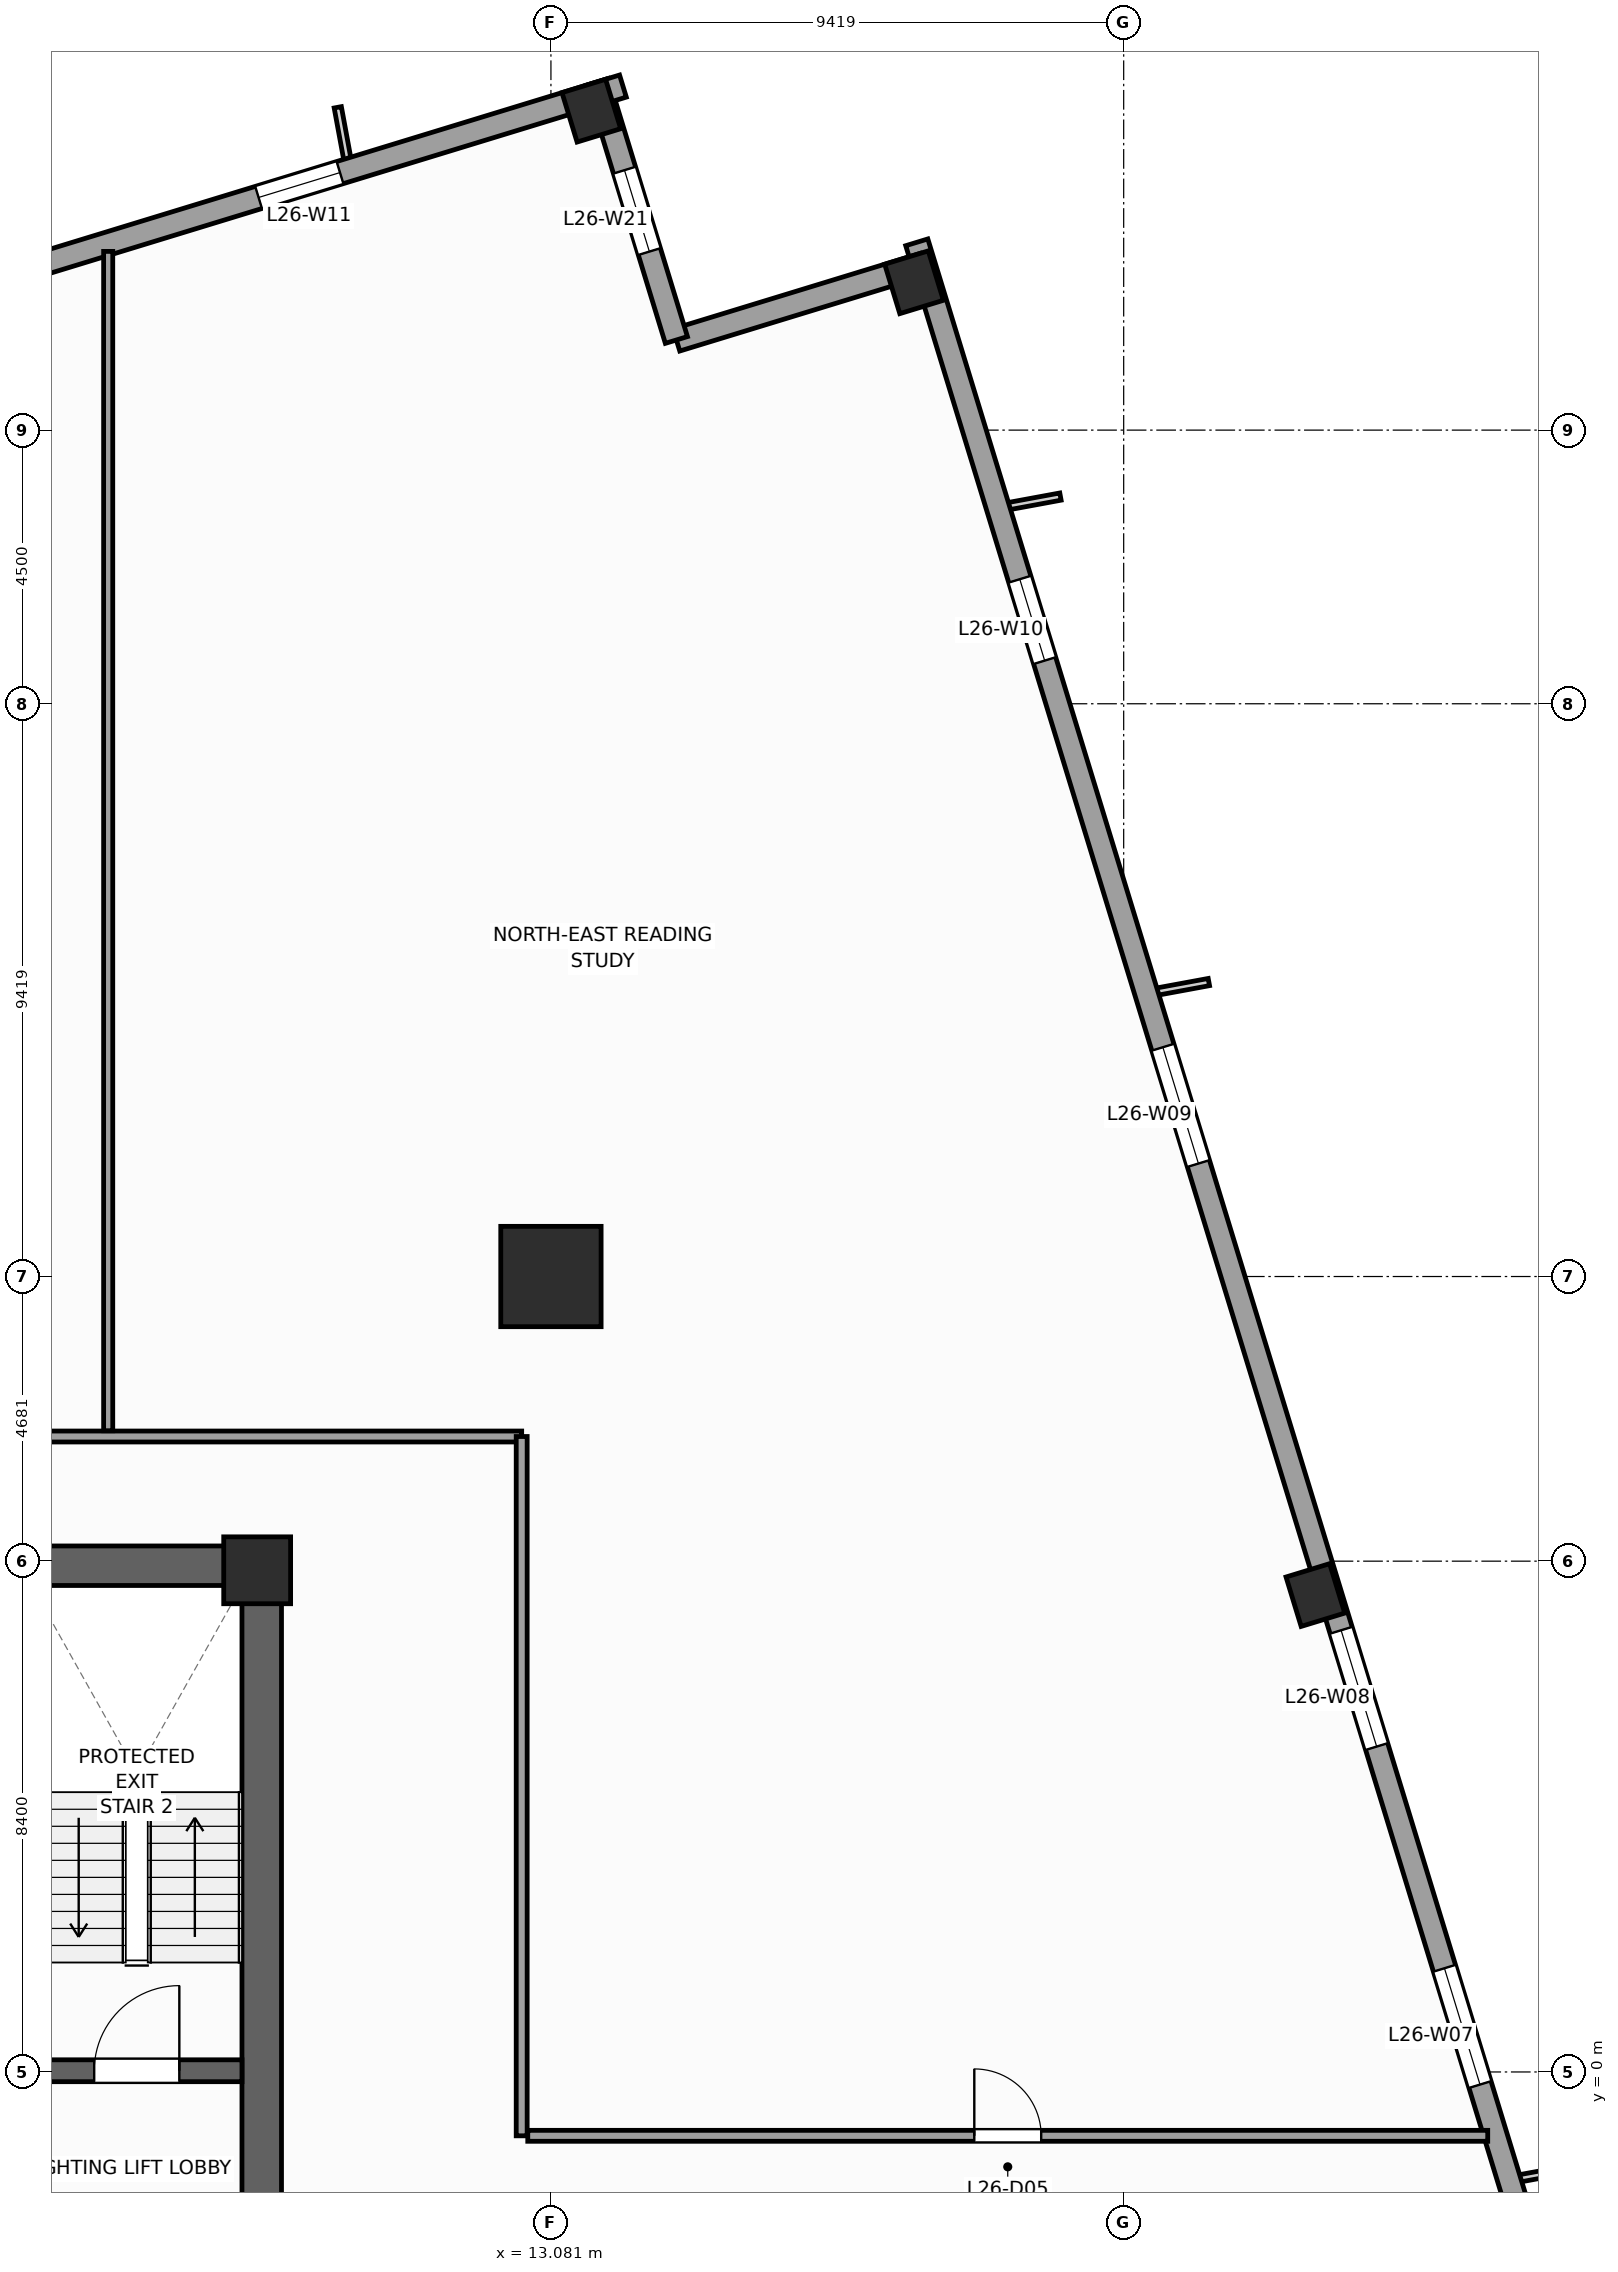
"""IFC4 building model, lengths in metres.
Left out: names, types, materials, properties, quantities, classifications, styles, units other than length and angle.
Written with IfcOpenShell. Run it as: python <this file> out.ifc"""

import sys

from ifc_helpers import new_model, si_unit, direction, frame, frame_2d, origin, origin_2d, place, context, subcontext, project, spatial, rectangle, extrude, source, transform, mapped, element, fill, save


model = new_model("IFC4")
c1 = context("Model", 3, precision=1e-05, world=origin(), true_north=direction((0.0, 1.0)))
c2 = subcontext(c1, "Body", "Model", "MODEL_VIEW")
j1 = project(units=[si_unit("LENGTHUNIT", "METRE"), si_unit("PLANEANGLEUNIT", "RADIAN")], contexts=[c1])
p1 = place(None, origin())
s1 = spatial("IfcSite", under=j1, at=p1, CompositionType="ELEMENT")
p2 = place(p1, origin())
s2 = spatial("IfcBuilding", under=s1, at=p2, CompositionType="ELEMENT")
p3 = place(p2, frame((0.0, 0.0, 111.2)))
s3 = spatial("IfcBuildingStorey", under=s2, at=p3, CompositionType="ELEMENT", Elevation=111.2)
p4 = place(p3, frame((-8.65, 8.325, 0.0), z_axis=(0.0, 0.0, 1.0), x_axis=(1.0, 0.0, 0.0)))
e1 = element("IfcWall", 1, at=p4, inside=s3, PredefinedType="SHEAR", context=c2, shape_type="SweptSolid", body=[
    extrude(rectangle(XDim=17.3, YDim=0.65, at=frame_2d((8.65, 0.0))), origin(), (0.0, 0.0, 1.0), 4.0),
])
p5 = place(p3, frame((8.325, -8.0, 0.0), z_axis=(0.0, 0.0, 1.0), x_axis=(0.0, 1.0, 0.0)))
e2 = element("IfcWall", 2, at=p5, inside=s3, PredefinedType="SHEAR", context=c2, shape_type="SweptSolid", body=[
    extrude(rectangle(XDim=16.0, YDim=0.65, at=frame_2d((8.0, 0.0))), origin(), (0.0, 0.0, 1.0), 4.0),
])
p6 = place(p5, frame((4.69, 0.0, 0.0)))
e3 = element("IfcOpeningElement", 3, at=p6, cuts=e2, PredefinedType="OPENING", context=c2, shape_type="SweptSolid", body=[
    extrude(rectangle(XDim=1.3, YDim=2.2, at=frame_2d((0.65, 1.1))), frame((0.0, 0.335, 0.0), z_axis=(0.0, -1.0, 0.0), x_axis=(1.0, 0.0, 0.0)), (0.0, 0.0, 1.0), 0.67),
])
p7 = place(p3, frame((4.54, 0.02, 0.0), z_axis=(0.0, 0.0, 1.0), x_axis=(1.0, 0.0, 0.0)))
e4 = element("IfcWall", 4, at=p7, inside=s3, PredefinedType="SHEAR", context=c2, shape_type="SweptSolid", body=[
    extrude(rectangle(XDim=3.46, YDim=0.36, at=frame_2d((1.73, 0.0))), origin(), (0.0, 0.0, 1.0), 4.0),
])
p8 = place(p7, frame((1.03, 0.0, 0.0)))
e5 = element("IfcOpeningElement", 5, at=p8, cuts=e4, PredefinedType="OPENING", context=c2, shape_type="SweptSolid", body=[
    extrude(rectangle(XDim=1.4, YDim=2.2, at=frame_2d((0.7, 1.1))), frame((0.0, 0.19, 0.0), z_axis=(0.0, -1.0, 0.0), x_axis=(1.0, 0.0, 0.0)), (0.0, 0.0, 1.0), 0.38),
])
m1 = source(origin(), c2, "Body", "SweptSolid", [
    extrude(rectangle(XDim=1.1, YDim=1.1, at=origin_2d()), origin(), (0.0, 0.0, 1.0), 4.0),
])
p9 = place(p3, frame((8.25, 8.25, 0.0), z_axis=(0.0, 0.0, 1.0), x_axis=(1.0, 0.0, 0.0)))
e6 = element("IfcColumn", 6, at=p9, inside=s3, PredefinedType="PILASTER", context=c2, shape_type="MappedRepresentation", body=[
    mapped(m1, transform((0.0, 0.0, 0.0), scale=1.0)),
])
m2 = source(origin(), c2, "Body", "SweptSolid", [
    extrude(rectangle(XDim=1.65, YDim=1.65, at=origin_2d()), origin(), (0.0, 0.0, 1.0), 4.0),
])
p10 = place(p3, frame((13.081, 13.081, 0.0), z_axis=(0.0, 0.0, 1.0), x_axis=(1.0, 0.0, 0.0)))
e7 = element("IfcColumn", 7, at=p10, inside=s3, PredefinedType="COLUMN", context=c2, shape_type="MappedRepresentation", body=[
    mapped(m2, transform((0.0, 0.0, 0.0), scale=1.0)),
])
m3 = source(origin(), c2, "Body", "SweptSolid", [
    extrude(rectangle(XDim=0.75, YDim=0.85, at=origin_2d()), origin(), (0.0, 0.0, 1.0), 4.0),
])
for number, where, z_axis, x_axis in (
    (8, (25.653, 7.843, 0.0), (0.0, 0.0, 1.0), (0.956, 0.292, 0.0)),
    (9, (19.052, 29.431, 0.0), (0.0, 0.0, 1.0), (0.956, 0.292, 0.0)),
    (10, (13.746, 32.253, 0.0), (0.0, 0.0, 1.0), (0.956, 0.292, 0.0)),
):
    element("IfcColumn", number, at=place(p3, frame(where, z_axis=z_axis, x_axis=x_axis)), inside=s3, PredefinedType="COLUMN", context=c2, shape_type="MappedRepresentation", body=[
        mapped(m3, transform((0.0, 0.0, 0.0), scale=1.0)),
    ])
p11 = place(p3, frame((32.658, -14.265, 0.0), z_axis=(0.0, 0.0, 1.0), x_axis=(-0.292373127906, 0.956304320851, 0.0)))
e11 = element("IfcWall", 11, at=p11, inside=s3, PredefinedType="STANDARD", context=c2, shape_type="SweptSolid", body=[
    extrude(rectangle(XDim=46.38, YDim=0.38, at=frame_2d((23.19, 0.0))), origin(), (0.0, 0.0, 1.0), 3.14),
])
p12 = place(p11, frame((4.865, 0.0, 0.51)))
e12 = element("IfcOpeningElement", 12, at=p12, cuts=e11, PredefinedType="OPENING", context=c2, shape_type="SweptSolid", body=[
    extrude(rectangle(XDim=1.4, YDim=2.4, at=frame_2d((0.7, 1.2))), frame((0.0, 0.2, 0.0), z_axis=(0.0, -1.0, 0.0), x_axis=(1.0, 0.0, 0.0)), (0.0, 0.0, 1.0), 0.4),
])
p13 = place(p11, frame((14.7, 0.0, 0.51)))
e13 = element("IfcOpeningElement", 13, at=p13, cuts=e11, PredefinedType="OPENING", context=c2, shape_type="SweptSolid", body=[
    extrude(rectangle(XDim=2.0, YDim=2.4, at=frame_2d((1.0, 1.2))), frame((0.0, 0.2, 0.0), z_axis=(0.0, -1.0, 0.0), x_axis=(1.0, 0.0, 0.0)), (0.0, 0.0, 1.0), 0.4),
])
p14 = place(p11, frame((20.512, 0.0, 0.51)))
e14 = element("IfcOpeningElement", 14, at=p14, cuts=e11, PredefinedType="OPENING", context=c2, shape_type="SweptSolid", body=[
    extrude(rectangle(XDim=2.0, YDim=2.4, at=frame_2d((1.0, 1.2))), frame((0.0, 0.2, 0.0), z_axis=(0.0, -1.0, 0.0), x_axis=(1.0, 0.0, 0.0)), (0.0, 0.0, 1.0), 0.4),
])
p15 = place(p11, frame((30.538, 0.0, 0.51)))
e15 = element("IfcOpeningElement", 15, at=p15, cuts=e11, PredefinedType="OPENING", context=c2, shape_type="SweptSolid", body=[
    extrude(rectangle(XDim=2.0, YDim=2.4, at=frame_2d((1.0, 1.2))), frame((0.0, 0.2, 0.0), z_axis=(0.0, -1.0, 0.0), x_axis=(1.0, 0.0, 0.0)), (0.0, 0.0, 1.0), 0.4),
])
p16 = place(p11, frame((39.187, 0.0, 0.51)))
e16 = element("IfcOpeningElement", 16, at=p16, cuts=e11, PredefinedType="OPENING", context=c2, shape_type="SweptSolid", body=[
    extrude(rectangle(XDim=1.4, YDim=2.4, at=frame_2d((0.7, 1.2))), frame((0.0, 0.2, 0.0), z_axis=(0.0, -1.0, 0.0), x_axis=(1.0, 0.0, 0.0)), (0.0, 0.0, 1.0), 0.4),
])
p17 = place(p3, frame((19.208, 29.725, 0.0), z_axis=(0.0, 0.0, 1.0), x_axis=(-0.956312764915, -0.292345507338, 0.0)))
e17 = element("IfcWall", 17, at=p17, inside=s3, PredefinedType="STANDARD", context=c2, shape_type="SweptSolid", body=[
    extrude(rectangle(XDim=4.25, YDim=0.38, at=frame_2d((2.125, 0.0))), origin(), (0.0, 0.0, 1.0), 3.74),
])
p18 = place(p3, frame((15.144, 28.482, 0.0), z_axis=(0.0, 0.0, 1.0), x_axis=(-0.292373601522, 0.956304176051, 0.0)))
e18 = element("IfcWall", 18, at=p18, inside=s3, PredefinedType="STANDARD", context=c2, shape_type="SweptSolid", body=[
    extrude(rectangle(XDim=4.44, YDim=0.38, at=frame_2d((2.22, 0.0))), origin(), (0.0, 0.0, 1.0), 3.04),
])
p19 = place(p18, frame((1.52, 0.0, 0.51)))
e19 = element("IfcOpeningElement", 19, at=p19, cuts=e18, PredefinedType="OPENING", context=c2, shape_type="SweptSolid", body=[
    extrude(rectangle(XDim=1.4, YDim=2.4, at=frame_2d((0.7, 1.2))), frame((0.0, 0.2, 0.0), z_axis=(0.0, -1.0, 0.0), x_axis=(1.0, 0.0, 0.0)), (0.0, 0.0, 1.0), 0.4),
])
p20 = place(p3, frame((14.265, 32.658, 0.0), z_axis=(0.0, 0.0, 1.0), x_axis=(-0.956304320851, -0.292373127906, 0.0)))
e20 = element("IfcWall", 20, at=p20, inside=s3, PredefinedType="STANDARD", context=c2, shape_type="SweptSolid", body=[
    extrude(rectangle(XDim=46.38, YDim=0.38, at=frame_2d((23.19, 0.0))), origin(), (0.0, 0.0, 1.0), 3.14),
])
p21 = place(p20, frame((28.265, 0.0, 0.0)))
e21 = element("IfcOpeningElement", 21, at=p21, cuts=e20, PredefinedType="OPENING", context=c2, shape_type="SweptSolid", body=[
    extrude(rectangle(XDim=1.05, YDim=2.25, at=frame_2d((0.525, 1.125))), frame((0.0, 0.2, 0.0), z_axis=(0.0, -1.0, 0.0), x_axis=(1.0, 0.0, 0.0)), (0.0, 0.0, 1.0), 0.4),
])
p22 = place(p20, frame((4.865, 0.0, 0.51)))
e22 = element("IfcOpeningElement", 22, at=p22, cuts=e20, PredefinedType="OPENING", context=c2, shape_type="SweptSolid", body=[
    extrude(rectangle(XDim=1.4, YDim=2.4, at=frame_2d((0.7, 1.2))), frame((0.0, 0.2, 0.0), z_axis=(0.0, -1.0, 0.0), x_axis=(1.0, 0.0, 0.0)), (0.0, 0.0, 1.0), 0.4),
])
p23 = place(p20, frame((12.45, 0.0, 0.51)))
e23 = element("IfcOpeningElement", 23, at=p23, cuts=e20, PredefinedType="OPENING", context=c2, shape_type="SweptSolid", body=[
    extrude(rectangle(XDim=2.0, YDim=2.4, at=frame_2d((1.0, 1.2))), frame((0.0, 0.2, 0.0), z_axis=(0.0, -1.0, 0.0), x_axis=(1.0, 0.0, 0.0)), (0.0, 0.0, 1.0), 0.4),
])
p24 = place(p20, frame((30.538, 0.0, 0.51)))
e24 = element("IfcOpeningElement", 24, at=p24, cuts=e20, PredefinedType="OPENING", context=c2, shape_type="SweptSolid", body=[
    extrude(rectangle(XDim=2.0, YDim=2.4, at=frame_2d((1.0, 1.2))), frame((0.0, 0.2, 0.0), z_axis=(0.0, -1.0, 0.0), x_axis=(1.0, 0.0, 0.0)), (0.0, 0.0, 1.0), 0.4),
])
p25 = place(p20, frame((39.187, 0.0, 0.51)))
e25 = element("IfcOpeningElement", 25, at=p25, cuts=e20, PredefinedType="OPENING", context=c2, shape_type="SweptSolid", body=[
    extrude(rectangle(XDim=1.4, YDim=2.4, at=frame_2d((0.7, 1.2))), frame((0.0, 0.2, 0.0), z_axis=(0.0, -1.0, 0.0), x_axis=(1.0, 0.0, 0.0)), (0.0, 0.0, 1.0), 0.4),
])
p26 = place(p3, frame((-12.6, 10.45, 0.0), z_axis=(0.0, 0.0, 1.0), x_axis=(1.0, 0.0, 0.0)))
e26 = element("IfcWall", 26, at=p26, inside=s3, PredefinedType="PARTITIONING", context=c2, shape_type="SweptSolid", body=[
    extrude(rectangle(XDim=25.2, YDim=0.18, at=frame_2d((12.6, 0.0))), origin(), (0.0, 0.0, 1.0), 3.74),
])
p27 = place(p26, frame((5.014, 0.0, 0.0)))
e27 = element("IfcOpeningElement", 27, at=p27, cuts=e26, PredefinedType="OPENING", context=c2, shape_type="SweptSolid", body=[
    extrude(rectangle(XDim=0.95, YDim=2.1, at=frame_2d((0.475, 1.05))), frame((0.0, 0.1, 0.0), z_axis=(0.0, -1.0, 0.0), x_axis=(1.0, 0.0, 0.0)), (0.0, 0.0, 1.0), 0.2),
])
p28 = place(p26, frame((2.59, 0.0, 0.0)))
e28 = element("IfcOpeningElement", 28, at=p28, cuts=e26, PredefinedType="OPENING", context=c2, shape_type="SweptSolid", body=[
    extrude(rectangle(XDim=0.95, YDim=2.1, at=frame_2d((0.475, 1.05))), frame((0.0, 0.1, 0.0), z_axis=(0.0, -1.0, 0.0), x_axis=(1.0, 0.0, 0.0)), (0.0, 0.0, 1.0), 0.2),
])
p29 = place(p26, frame((12.05, 0.0, 0.0)))
e29 = element("IfcOpeningElement", 29, at=p29, cuts=e26, PredefinedType="OPENING", context=c2, shape_type="SweptSolid", body=[
    extrude(rectangle(XDim=1.1, YDim=2.2, at=frame_2d((0.55, 1.1))), frame((0.0, 0.1, 0.0), z_axis=(0.0, -1.0, 0.0), x_axis=(1.0, 0.0, 0.0)), (0.0, 0.0, 1.0), 0.2),
])
p30 = place(p3, frame((12.6, -1.05, 0.0), z_axis=(0.0, 0.0, 1.0), x_axis=(0.0, 1.0, 0.0)))
e30 = element("IfcWall", 30, at=p30, inside=s3, PredefinedType="PARTITIONING", context=c2, shape_type="SweptSolid", body=[
    extrude(rectangle(XDim=11.5, YDim=0.18, at=frame_2d((5.75, 0.0))), origin(), (0.0, 0.0, 1.0), 3.74),
])
p31 = place(p3, frame((12.7, -1.05, 0.0), z_axis=(0.0, 0.0, 1.0), x_axis=(1.0, 0.0, 0.0)))
e31 = element("IfcWall", 31, at=p31, inside=s3, PredefinedType="PARTITIONING", context=c2, shape_type="SweptSolid", body=[
    extrude(rectangle(XDim=15.787, YDim=0.18, at=frame_2d((7.894, 0.0))), origin(), (0.0, 0.0, 1.0), 3.74),
])
p32 = place(p31, frame((7.343, 0.0, 0.0)))
e32 = element("IfcOpeningElement", 32, at=p32, cuts=e31, PredefinedType="OPENING", context=c2, shape_type="SweptSolid", body=[
    extrude(rectangle(XDim=1.1, YDim=2.2, at=frame_2d((0.55, 1.1))), frame((0.0, 0.1, 0.0), z_axis=(0.0, -1.0, 0.0), x_axis=(1.0, 0.0, 0.0)), (0.0, 0.0, 1.0), 0.2),
])
p33 = place(p3, frame((5.8, 10.545, 0.0), z_axis=(0.0, 0.0, 1.0), x_axis=(0.0, 1.0, 0.0)))
e33 = element("IfcWall", 33, at=p33, inside=s3, PredefinedType="PARTITIONING", context=c2, shape_type="SweptSolid", body=[
    extrude(rectangle(XDim=19.394, YDim=0.15, at=frame_2d((9.697, 0.0))), origin(), (0.0, 0.0, 1.0), 3.74),
])
m4 = source(origin(), c2, "Body", "SweptSolid", [
    extrude(rectangle(XDim=2.0, YDim=2.4, at=frame_2d((1.0, 1.2))), frame((0.0, 0.03, 0.0), z_axis=(0.0, -1.0, 0.0), x_axis=(1.0, 0.0, 0.0)), (0.0, 0.0, 1.0), 0.06),
])
p34 = place(p13, origin())
e34 = element("IfcWindow", 34, at=p34, inside=s3, PartitioningType="SINGLE_PANEL", PredefinedType="WINDOW", context=c2, shape_type="MappedRepresentation", body=[
    mapped(m4, transform((0.0, 0.0, 0.0), scale=1.0)),
])
fill(e13, e34)
p35 = place(p14, origin())
e35 = element("IfcWindow", 35, at=p35, inside=s3, PartitioningType="SINGLE_PANEL", PredefinedType="WINDOW", context=c2, shape_type="MappedRepresentation", body=[
    mapped(m4, transform((0.0, 0.0, 0.0), scale=1.0)),
])
fill(e14, e35)
p36 = place(p15, origin())
e36 = element("IfcWindow", 36, at=p36, inside=s3, PartitioningType="SINGLE_PANEL", PredefinedType="WINDOW", context=c2, shape_type="MappedRepresentation", body=[
    mapped(m4, transform((0.0, 0.0, 0.0), scale=1.0)),
])
fill(e15, e36)
m5 = source(origin(), c2, "Body", "SweptSolid", [
    extrude(rectangle(XDim=1.4, YDim=2.4, at=frame_2d((0.7, 1.2))), frame((0.0, 0.03, 0.0), z_axis=(0.0, -1.0, 0.0), x_axis=(1.0, 0.0, 0.0)), (0.0, 0.0, 1.0), 0.06),
])
p37 = place(p16, origin())
e37 = element("IfcWindow", 37, at=p37, inside=s3, PartitioningType="SINGLE_PANEL", PredefinedType="WINDOW", context=c2, shape_type="MappedRepresentation", body=[
    mapped(m5, transform((0.0, 0.0, 0.0), scale=1.0)),
])
fill(e16, e37)
p38 = place(p22, origin())
e38 = element("IfcWindow", 38, at=p38, inside=s3, PartitioningType="SINGLE_PANEL", PredefinedType="WINDOW", context=c2, shape_type="MappedRepresentation", body=[
    mapped(m5, transform((0.0, 0.0, 0.0), scale=1.0)),
])
fill(e22, e38)
p39 = place(p19, origin())
e39 = element("IfcWindow", 39, at=p39, inside=s3, PartitioningType="SINGLE_PANEL", PredefinedType="WINDOW", context=c2, shape_type="MappedRepresentation", body=[
    mapped(m5, transform((0.0, 0.0, 0.0), scale=1.0)),
])
fill(e19, e39)
m6 = source(origin(), c2, "Body", "SweptSolid", [
    extrude(rectangle(XDim=1.4, YDim=2.2, at=frame_2d((0.7, 1.1))), frame((0.0, 0.025, 0.0), z_axis=(0.0, -1.0, 0.0), x_axis=(1.0, 0.0, 0.0)), (0.0, 0.0, 1.0), 0.05),
])
p40 = place(p8, origin())
e40 = element("IfcDoor", 40, at=p40, inside=s3, OperationType="SINGLE_SWING_RIGHT", PredefinedType="DOOR", context=c2, shape_type="MappedRepresentation", body=[
    mapped(m6, transform((0.0, 0.0, 0.0), scale=1.0)),
])
fill(e5, e40)
m7 = source(origin(), c2, "Body", "SweptSolid", [
    extrude(rectangle(XDim=1.1, YDim=2.2, at=frame_2d((0.55, 1.1))), frame((0.0, 0.025, 0.0), z_axis=(0.0, -1.0, 0.0), x_axis=(1.0, 0.0, 0.0)), (0.0, 0.0, 1.0), 0.05),
])
p41 = place(p32, origin())
e41 = element("IfcDoor", 41, at=p41, inside=s3, OperationType="SINGLE_SWING_LEFT", PredefinedType="DOOR", context=c2, shape_type="MappedRepresentation", body=[
    mapped(m7, transform((0.0, 0.0, 0.0), scale=1.0)),
])
fill(e32, e41)
save(model, sys.argv[1])
